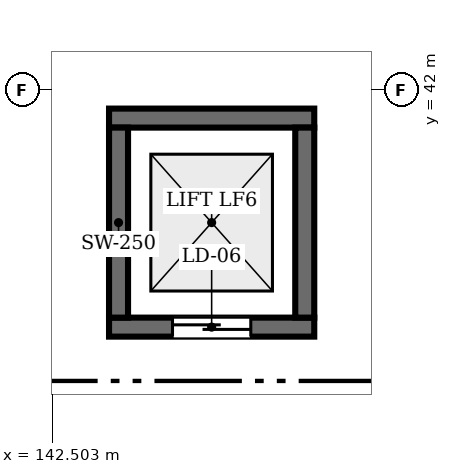
"""IFC4 building model, lengths in metres.
Left out: names, types, materials, properties, quantities, classifications, styles, units other than length and angle.
Written with IfcOpenShell. Run it as: python <this file> out.ifc"""

import sys

from ifc_helpers import new_model, si_unit, direction, frame, frame_2d, origin, place, context, subcontext, project, spatial, rectangle, extrude, element, fill, save


model = new_model("IFC4")
c1 = context("Model", 3, precision=1e-05, world=origin(), true_north=direction((0.0, 1.0)))
c2 = subcontext(c1, "Body", "Model", "MODEL_VIEW")
j1 = project(units=[si_unit("LENGTHUNIT", "METRE"), si_unit("PLANEANGLEUNIT", "RADIAN")], contexts=[c1])
p1 = place(None, origin())
s1 = spatial("IfcSite", under=j1, at=p1, CompositionType="ELEMENT")
p2 = place(p1, origin())
s2 = spatial("IfcBuilding", under=s1, at=p2, CompositionType="ELEMENT")
p3 = place(p2, frame((0.0, 0.0, -9.6)))
s3 = spatial("IfcBuildingStorey", under=s2, at=p3, CompositionType="ELEMENT", Elevation=-9.6)
p4 = place(p3, frame((143.25, 38.875, 0.0), z_axis=(0.0, 0.0, 1.0), x_axis=(1.0, 0.0, 0.0)))
e1 = element("IfcWall", 1, at=p4, inside=s3, PredefinedType="SHEAR", context=c2, shape_type="SweptSolid", body=[
    extrude(rectangle(XDim=2.7, YDim=0.25, at=frame_2d((1.35, 0.0))), origin(), (0.0, 0.0, 1.0), 4.48),
])
p5 = place(p4, frame((0.835, 0.0, 0.0)))
e2 = element("IfcOpeningElement", 2, at=p5, cuts=e1, PredefinedType="OPENING", context=c2, shape_type="SweptSolid", body=[
    extrude(rectangle(XDim=1.03, YDim=2.15, at=frame_2d((0.515, 1.075))), frame((0.0, 0.135, 0.0), z_axis=(0.0, -1.0, 0.0), x_axis=(1.0, 0.0, 0.0)), (0.0, 0.0, 1.0), 0.27),
])
p6 = place(p3, frame((143.25, 41.625, 0.0), z_axis=(0.0, 0.0, 1.0), x_axis=(1.0, 0.0, 0.0)))
e3 = element("IfcWall", 3, at=p6, inside=s3, PredefinedType="SHEAR", context=c2, shape_type="SweptSolid", body=[
    extrude(rectangle(XDim=2.7, YDim=0.25, at=frame_2d((1.35, 0.0))), origin(), (0.0, 0.0, 1.0), 4.48),
])
for number, where, z_axis, x_axis in (
    (4, (143.375, 39.0, 0.0), (0.0, 0.0, 1.0), (0.0, 1.0, 0.0)),
    (5, (145.825, 39.0, 0.0), (0.0, 0.0, 1.0), (0.0, 1.0, 0.0)),
):
    element("IfcWall", number, at=place(p3, frame(where, z_axis=z_axis, x_axis=x_axis)), inside=s3, PredefinedType="SHEAR", context=c2, shape_type="SweptSolid", body=[
        extrude(rectangle(XDim=2.5, YDim=0.25, at=frame_2d((1.25, 0.0))), origin(), (0.0, 0.0, 1.0), 4.48),
    ])
p7 = place(p5, origin())
e6 = element("IfcDoor", 6, at=p7, inside=s3, OperationType="SLIDING_TO_LEFT", PredefinedType="DOOR", context=c2, shape_type="SweptSolid", body=[
    extrude(rectangle(XDim=1.03, YDim=2.15, at=frame_2d((0.515, 1.075))), frame((0.0, 0.025, 0.0), z_axis=(0.0, -1.0, 0.0), x_axis=(1.0, 0.0, 0.0)), (0.0, 0.0, 1.0), 0.05),
])
fill(e2, e6)
save(model, sys.argv[1])
